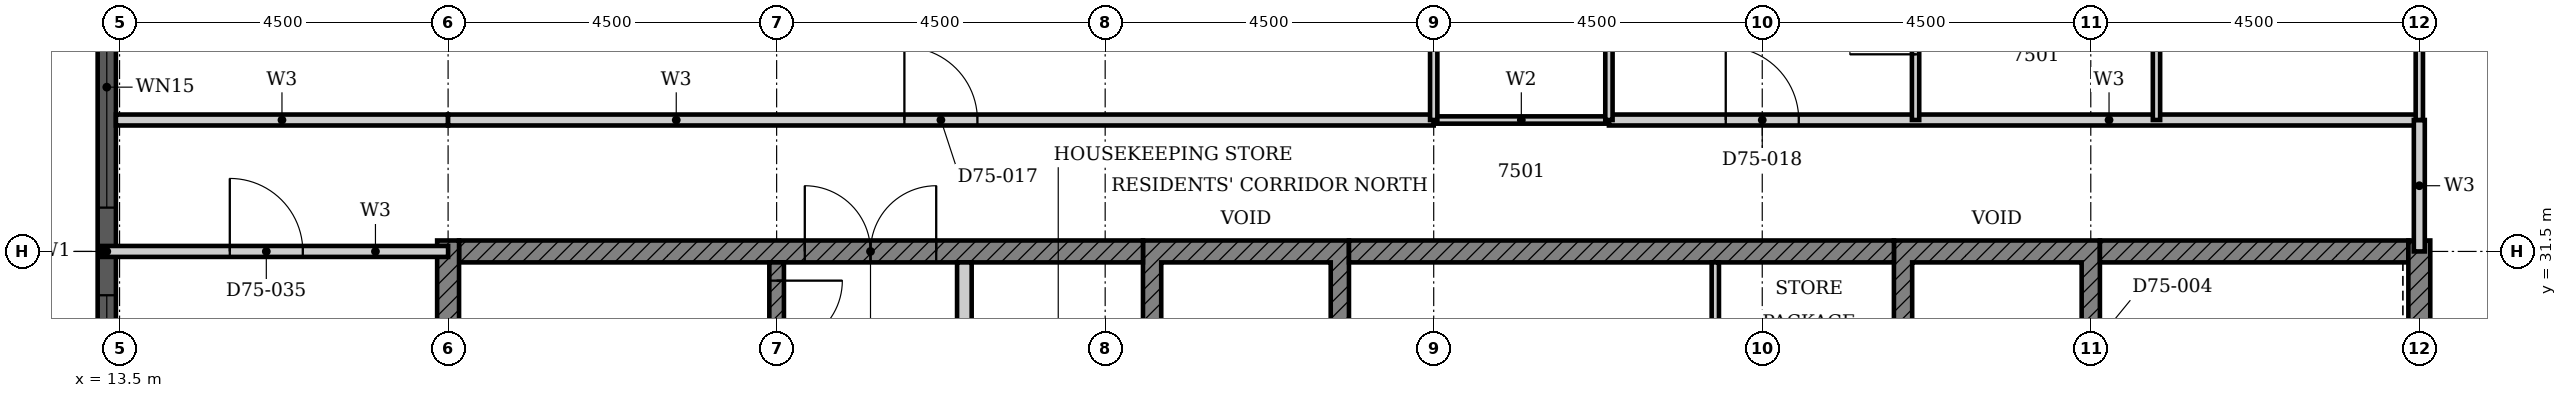
"""IFC4 building model, lengths in metres.
Left out: names, types, materials, properties, quantities, classifications, styles, units other than length and angle.
Written with IfcOpenShell. Run it as: python <this file> out.ifc"""

import sys

from ifc_helpers import new_model, si_unit, direction, frame, frame_2d, origin, place, context, subcontext, project, spatial, polyline, rectangle, outline, extrude, element, fill, save


model = new_model("IFC4")
c1 = context("Model", 3, precision=1e-05, world=origin(), true_north=direction((0.0, 1.0)))
c2 = subcontext(c1, "Body", "Model", "MODEL_VIEW")
j1 = project(units=[si_unit("LENGTHUNIT", "METRE"), si_unit("PLANEANGLEUNIT", "RADIAN")], contexts=[c1])
p1 = place(None, origin())
s1 = spatial("IfcSite", under=j1, at=p1, CompositionType="ELEMENT")
p2 = place(p1, origin())
s2 = spatial("IfcBuilding", under=s1, at=p2, CompositionType="ELEMENT")
p3 = place(p2, frame((0.0, 0.0, 294.5)))
s3 = spatial("IfcBuildingStorey", under=s2, at=p3, CompositionType="ELEMENT", Elevation=294.5)
p4 = place(p3, frame((13.325, 35.7, 0.0), z_axis=(0.0, 0.0, 1.0), x_axis=(0.0, -1.0, 0.0)))
e1 = element("IfcWall", 1, at=p4, inside=s3, PredefinedType="SOLIDWALL", context=c2, shape_type="SweptSolid", body=[
    extrude(rectangle(XDim=8.4, YDim=0.25, at=frame_2d((4.2, 0.0))), origin(), (0.0, 0.0, 1.0), 3.7),
])
p5 = place(p4, frame((0.3, 0.0, 0.45)))
e2 = element("IfcOpeningElement", 2, at=p5, cuts=e1, PredefinedType="OPENING", context=c2, shape_type="SweptSolid", body=[
    extrude(rectangle(XDim=3.3, YDim=2.3, at=frame_2d((1.65, 1.15))), frame((0.0, 0.135, 0.0), z_axis=(0.0, -1.0, 0.0), x_axis=(1.0, 0.0, 0.0)), (0.0, 0.0, 1.0), 0.27),
])
p6 = place(p4, frame((4.8, 0.0, 0.45)))
e3 = element("IfcOpeningElement", 3, at=p6, cuts=e1, PredefinedType="OPENING", context=c2, shape_type="SweptSolid", body=[
    extrude(rectangle(XDim=3.3, YDim=2.3, at=frame_2d((1.65, 1.15))), frame((0.0, 0.135, 0.0), z_axis=(0.0, -1.0, 0.0), x_axis=(1.0, 0.0, 0.0)), (0.0, 0.0, 1.0), 0.27),
])
p7 = place(p3, origin())
e4 = element("IfcWall", 4, at=p7, inside=s3, PredefinedType="SHEAR", context=c2, shape_type="SweptSolid", body=[
    extrude(outline(polyline([(27.518, 28.725), (27.768, 28.725), (27.768, 31.35), (30.089, 31.35), (30.089, 28.725), (30.339, 28.725), (30.339, 31.65), (27.518, 31.65), (27.518, 28.725)])), origin(), (0.0, 0.0, 1.0), 3.4),
])
p8 = place(p3, origin())
e5 = element("IfcWall", 5, at=p8, inside=s3, PredefinedType="SHEAR", context=c2, shape_type="SweptSolid", body=[
    extrude(outline(polyline([(37.803, 28.725), (38.053, 28.725), (38.053, 31.35), (40.375, 31.35), (40.375, 28.725), (40.625, 28.725), (40.625, 31.65), (37.803, 31.65), (37.803, 28.725)])), origin(), (0.0, 0.0, 1.0), 3.4),
])
p9 = place(p3, frame((18.15, 31.5, 0.0), z_axis=(0.0, 0.0, 1.0), x_axis=(1.0, 0.0, 0.0)))
e6 = element("IfcWall", 6, at=p9, inside=s3, PredefinedType="SHEAR", context=c2, shape_type="SweptSolid", body=[
    extrude(rectangle(XDim=9.368, YDim=0.3, at=frame_2d((4.684, 0.0))), origin(), (0.0, 0.0, 1.0), 3.4),
])
p10 = place(p9, frame((4.736, 0.0, 0.0)))
e7 = element("IfcOpeningElement", 7, at=p10, cuts=e6, PredefinedType="OPENING", context=c2, shape_type="SweptSolid", body=[
    extrude(rectangle(XDim=1.8, YDim=2.1, at=frame_2d((0.9, 1.05))), frame((0.0, 0.16, 0.0), z_axis=(0.0, -1.0, 0.0), x_axis=(1.0, 0.0, 0.0)), (0.0, 0.0, 1.0), 0.32),
])
p11 = place(p3, frame((30.339, 31.5, 0.0), z_axis=(0.0, 0.0, 1.0), x_axis=(1.0, 0.0, 0.0)))
e8 = element("IfcWall", 8, at=p11, inside=s3, PredefinedType="SHEAR", context=c2, shape_type="SweptSolid", body=[
    extrude(rectangle(XDim=7.464, YDim=0.3, at=frame_2d((3.732, 0.0))), origin(), (0.0, 0.0, 1.0), 3.4),
])
p12 = place(p3, frame((40.625, 31.5, 0.0), z_axis=(0.0, 0.0, 1.0), x_axis=(1.0, 0.0, 0.0)))
e9 = element("IfcWall", 9, at=p12, inside=s3, PredefinedType="SHEAR", context=c2, shape_type="SweptSolid", body=[
    extrude(rectangle(XDim=4.225, YDim=0.3, at=frame_2d((2.113, 0.0))), origin(), (0.0, 0.0, 1.0), 3.4),
])
for number, where, z_axis, x_axis in (
    (10, (18.0, 22.35, 0.0), (0.0, 0.0, 1.0), (0.0, 1.0, 0.0)),
    (11, (45.0, 22.35, 0.0), (0.0, 0.0, 1.0), (0.0, 1.0, 0.0)),
):
    element("IfcWall", number, at=place(p3, frame(where, z_axis=z_axis, x_axis=x_axis)), inside=s3, PredefinedType="SHEAR", context=c2, shape_type="SweptSolid", body=[
        extrude(rectangle(XDim=9.3, YDim=0.3, at=frame_2d((4.65, 0.0))), origin(), (0.0, 0.0, 1.0), 3.4),
    ])
p13 = place(p3, frame((25.072, 28.725, 0.0), z_axis=(0.0, 0.0, 1.0), x_axis=(0.0, 1.0, 0.0)))
e12 = element("IfcWall", 12, at=p13, inside=s3, PredefinedType="PARTITIONING", context=c2, shape_type="SweptSolid", body=[
    extrude(rectangle(XDim=2.625, YDim=0.2, at=frame_2d((1.312, 0.0))), origin(), (0.0, 0.0, 1.0), 3.4),
])
p14 = place(p3, frame((35.357, 28.725, 0.0), z_axis=(0.0, 0.0, 1.0), x_axis=(0.0, 1.0, 0.0)))
e13 = element("IfcWall", 13, at=p14, inside=s3, PredefinedType="PARTITIONING", context=c2, shape_type="SweptSolid", body=[
    extrude(rectangle(XDim=2.625, YDim=0.1, at=frame_2d((1.312, 0.0))), origin(), (0.0, 0.0, 1.0), 3.4),
])
p15 = place(p3, frame((22.5, 31.35, 0.0), z_axis=(0.0, 0.0, 1.0), x_axis=(0.0, -1.0, 0.0)))
e14 = element("IfcWall", 14, at=p15, inside=s3, PredefinedType="SHEAR", context=c2, shape_type="SweptSolid", body=[
    extrude(rectangle(XDim=5.825, YDim=0.2, at=frame_2d((2.913, 0.0))), origin(), (0.0, 0.0, 1.0), 3.4),
])
p16 = place(p15, frame((0.25, 0.0, 0.0)))
e15 = element("IfcOpeningElement", 15, at=p16, cuts=e14, PredefinedType="OPENING", context=c2, shape_type="SweptSolid", body=[
    extrude(rectangle(XDim=1.8, YDim=2.1, at=frame_2d((0.9, 1.05))), frame((0.0, 0.11, 0.0), z_axis=(0.0, -1.0, 0.0), x_axis=(1.0, 0.0, 0.0)), (0.0, 0.0, 1.0), 0.22),
])
p17 = place(p3, frame((13.26, 31.5, 0.0), z_axis=(0.0, 0.0, 1.0), x_axis=(1.0, 0.0, 0.0)))
e16 = element("IfcWall", 16, at=p17, inside=s3, PredefinedType="PARTITIONING", context=c2, shape_type="SweptSolid", body=[
    extrude(rectangle(XDim=4.74, YDim=0.15, at=frame_2d((2.37, 0.0))), origin(), (0.0, 0.0, 1.0), 3.4),
])
p18 = place(p17, frame((1.75, 0.0, 0.0)))
e17 = element("IfcOpeningElement", 17, at=p18, cuts=e16, PredefinedType="OPENING", context=c2, shape_type="SweptSolid", body=[
    extrude(rectangle(XDim=1.0, YDim=2.2, at=frame_2d((0.5, 1.1))), frame((0.0, 0.085, 0.0), z_axis=(0.0, -1.0, 0.0), x_axis=(1.0, 0.0, 0.0)), (0.0, 0.0, 1.0), 0.17),
])
p19 = place(p3, frame((13.45, 33.3, 0.0), z_axis=(0.0, 0.0, 1.0), x_axis=(1.0, 0.0, 0.0)))
e18 = element("IfcWall", 18, at=p19, inside=s3, PredefinedType="PARTITIONING", context=c2, shape_type="SweptSolid", body=[
    extrude(rectangle(XDim=4.549, YDim=0.15, at=frame_2d((2.274, 0.0))), origin(), (0.0, 0.0, 1.0), 3.4),
])
p20 = place(p3, frame((18.0, 33.3, 0.0), z_axis=(0.0, 0.0, 1.0), x_axis=(1.0, 0.0, 0.0)))
e19 = element("IfcWall", 19, at=p20, inside=s3, PredefinedType="PARTITIONING", context=c2, shape_type="SweptSolid", body=[
    extrude(rectangle(XDim=13.5, YDim=0.15, at=frame_2d((6.75, 0.0))), origin(), (0.0, 0.0, 1.0), 3.4),
])
p21 = place(p20, frame((6.25, 0.0, 0.0)))
e20 = element("IfcOpeningElement", 20, at=p21, cuts=e19, PredefinedType="OPENING", context=c2, shape_type="SweptSolid", body=[
    extrude(rectangle(XDim=1.0, YDim=2.1, at=frame_2d((0.5, 1.05))), frame((0.0, 0.085, 0.0), z_axis=(0.0, -1.0, 0.0), x_axis=(1.0, 0.0, 0.0)), (0.0, 0.0, 1.0), 0.17),
])
p22 = place(p3, frame((33.9, 33.3, 0.0), z_axis=(0.0, 0.0, 1.0), x_axis=(1.0, 0.0, 0.0)))
e21 = element("IfcWall", 21, at=p22, inside=s3, PredefinedType="PARTITIONING", context=c2, shape_type="SweptSolid", body=[
    extrude(rectangle(XDim=11.1, YDim=0.15, at=frame_2d((5.55, 0.0))), origin(), (0.0, 0.0, 1.0), 3.4),
])
p23 = place(p22, frame((1.6, 0.0, 0.0)))
e22 = element("IfcOpeningElement", 22, at=p23, cuts=e21, PredefinedType="OPENING", context=c2, shape_type="SweptSolid", body=[
    extrude(rectangle(XDim=1.0, YDim=2.2, at=frame_2d((0.5, 1.1))), frame((0.0, 0.085, 0.0), z_axis=(0.0, -1.0, 0.0), x_axis=(1.0, 0.0, 0.0)), (0.0, 0.0, 1.0), 0.17),
])
p24 = place(p3, frame((45.0, 31.5, 0.0), z_axis=(0.0, 0.0, 1.0), x_axis=(0.0, 1.0, 0.0)))
e23 = element("IfcWall", 23, at=p24, inside=s3, PredefinedType="PARTITIONING", context=c2, shape_type="SweptSolid", body=[
    extrude(rectangle(XDim=1.8, YDim=0.15, at=frame_2d((0.9, 0.0))), origin(), (0.0, 0.0, 1.0), 3.4),
])
p25 = place(p3, frame((38.1, 33.3, 0.0), z_axis=(0.0, 0.0, 1.0), x_axis=(0.0, 1.0, 0.0)))
e24 = element("IfcWall", 24, at=p25, inside=s3, PredefinedType="PARTITIONING", context=c2, shape_type="SweptSolid", body=[
    extrude(rectangle(XDim=2.7, YDim=0.1, at=frame_2d((1.35, 0.0))), origin(), (0.0, 0.0, 1.0), 3.4),
])
p26 = place(p25, frame((0.9, 0.0, 0.0)))
e25 = element("IfcOpeningElement", 25, at=p26, cuts=e24, PredefinedType="OPENING", context=c2, shape_type="SweptSolid", body=[
    extrude(rectangle(XDim=0.9, YDim=2.1, at=frame_2d((0.45, 1.05))), frame((0.0, 0.06, 0.0), z_axis=(0.0, -1.0, 0.0), x_axis=(1.0, 0.0, 0.0)), (0.0, 0.0, 1.0), 0.12),
])
p27 = place(p3, frame((41.4, 33.3, 0.0), z_axis=(0.0, 0.0, 1.0), x_axis=(0.0, 1.0, 0.0)))
e26 = element("IfcWall", 26, at=p27, inside=s3, PredefinedType="PARTITIONING", context=c2, shape_type="SweptSolid", body=[
    extrude(rectangle(XDim=2.7, YDim=0.1, at=frame_2d((1.35, 0.0))), origin(), (0.0, 0.0, 1.0), 3.4),
])
p28 = place(p3, frame((45.0, 33.3, 0.0), z_axis=(0.0, 0.0, 1.0), x_axis=(0.0, 1.0, 0.0)))
e27 = element("IfcWall", 27, at=p28, inside=s3, PredefinedType="PARTITIONING", context=c2, shape_type="SweptSolid", body=[
    extrude(rectangle(XDim=4.9, YDim=0.1, at=frame_2d((2.45, 0.0))), origin(), (0.0, 0.0, 1.0), 3.4),
])
p29 = place(p3, frame((31.5, 33.3, 0.0), z_axis=(0.0, 0.0, 1.0), x_axis=(1.0, 0.0, 0.0)))
e28 = element("IfcWall", 28, at=p29, inside=s3, PredefinedType="PARTITIONING", context=c2, shape_type="SweptSolid", body=[
    extrude(rectangle(XDim=2.4, YDim=0.1, at=frame_2d((1.2, 0.0))), origin(), (0.0, 0.0, 1.0), 3.4),
])
p30 = place(p3, frame((31.5, 33.3, 0.0), z_axis=(0.0, 0.0, 1.0), x_axis=(0.0, 1.0, 0.0)))
e29 = element("IfcWall", 29, at=p30, inside=s3, PredefinedType="PARTITIONING", context=c2, shape_type="SweptSolid", body=[
    extrude(rectangle(XDim=2.7, YDim=0.1, at=frame_2d((1.35, 0.0))), origin(), (0.0, 0.0, 1.0), 3.4),
])
p31 = place(p3, frame((33.9, 33.3, 0.0), z_axis=(0.0, 0.0, 1.0), x_axis=(0.0, 1.0, 0.0)))
e30 = element("IfcWall", 30, at=p31, inside=s3, PredefinedType="PARTITIONING", context=c2, shape_type="SweptSolid", body=[
    extrude(rectangle(XDim=2.7, YDim=0.1, at=frame_2d((1.35, 0.0))), origin(), (0.0, 0.0, 1.0), 3.4),
])
p32 = place(p31, frame((0.95, 0.0, 0.0)))
e31 = element("IfcOpeningElement", 31, at=p32, cuts=e30, PredefinedType="OPENING", context=c2, shape_type="SweptSolid", body=[
    extrude(rectangle(XDim=0.8, YDim=2.1, at=frame_2d((0.4, 1.05))), frame((0.0, 0.06, 0.0), z_axis=(0.0, -1.0, 0.0), x_axis=(1.0, 0.0, 0.0)), (0.0, 0.0, 1.0), 0.12),
])
p33 = place(p5, origin())
e32 = element("IfcWindow", 32, at=p33, inside=s3, PartitioningType="SINGLE_PANEL", PredefinedType="WINDOW", context=c2, shape_type="SweptSolid", body=[
    extrude(rectangle(XDim=3.3, YDim=2.3, at=frame_2d((1.65, 1.15))), frame((0.0, 0.03, 0.0), z_axis=(0.0, -1.0, 0.0), x_axis=(1.0, 0.0, 0.0)), (0.0, 0.0, 1.0), 0.06),
])
fill(e2, e32)
p34 = place(p6, origin())
e33 = element("IfcWindow", 33, at=p34, inside=s3, PartitioningType="SINGLE_PANEL", PredefinedType="WINDOW", context=c2, shape_type="SweptSolid", body=[
    extrude(rectangle(XDim=3.3, YDim=2.3, at=frame_2d((1.65, 1.15))), frame((0.0, 0.03, 0.0), z_axis=(0.0, -1.0, 0.0), x_axis=(1.0, 0.0, 0.0)), (0.0, 0.0, 1.0), 0.06),
])
fill(e3, e33)
p35 = place(p16, origin())
e34 = element("IfcDoor", 34, at=p35, inside=s3, OperationType="DOUBLE_DOOR_SINGLE_SWING", PredefinedType="DOOR", context=c2, shape_type="SweptSolid", body=[
    extrude(rectangle(XDim=1.8, YDim=2.1, at=frame_2d((0.9, 1.05))), frame((0.0, 0.025, 0.0), z_axis=(0.0, -1.0, 0.0), x_axis=(1.0, 0.0, 0.0)), (0.0, 0.0, 1.0), 0.05),
])
fill(e15, e34)
p36 = place(p10, origin())
e35 = element("IfcDoor", 35, at=p36, inside=s3, OperationType="DOUBLE_DOOR_SINGLE_SWING", PredefinedType="DOOR", context=c2, shape_type="SweptSolid", body=[
    extrude(rectangle(XDim=1.8, YDim=2.1, at=frame_2d((0.9, 1.05))), frame((0.0, 0.025, 0.0), z_axis=(0.0, -1.0, 0.0), x_axis=(1.0, 0.0, 0.0)), (0.0, 0.0, 1.0), 0.05),
])
fill(e7, e35)
p37 = place(p21, origin())
e36 = element("IfcDoor", 36, at=p37, inside=s3, OperationType="SINGLE_SWING_LEFT", PredefinedType="DOOR", context=c2, shape_type="SweptSolid", body=[
    extrude(rectangle(XDim=1.0, YDim=2.1, at=frame_2d((0.5, 1.05))), frame((0.0, 0.025, 0.0), z_axis=(0.0, -1.0, 0.0), x_axis=(1.0, 0.0, 0.0)), (0.0, 0.0, 1.0), 0.05),
])
fill(e20, e36)
p38 = place(p23, origin())
e37 = element("IfcDoor", 37, at=p38, inside=s3, OperationType="SINGLE_SWING_RIGHT", PredefinedType="DOOR", context=c2, shape_type="SweptSolid", body=[
    extrude(rectangle(XDim=1.0, YDim=2.2, at=frame_2d((0.5, 1.1))), frame((0.0, 0.025, 0.0), z_axis=(0.0, -1.0, 0.0), x_axis=(1.0, 0.0, 0.0)), (0.0, 0.0, 1.0), 0.05),
])
fill(e22, e37)
p39 = place(p26, origin())
e38 = element("IfcDoor", 38, at=p39, inside=s3, OperationType="SINGLE_SWING_RIGHT", PredefinedType="DOOR", context=c2, shape_type="SweptSolid", body=[
    extrude(rectangle(XDim=0.9, YDim=2.1, at=frame_2d((0.45, 1.05))), frame((0.0, 0.025, 0.0), z_axis=(0.0, -1.0, 0.0), x_axis=(1.0, 0.0, 0.0)), (0.0, 0.0, 1.0), 0.05),
])
fill(e25, e38)
p40 = place(p18, origin())
e39 = element("IfcDoor", 39, at=p40, inside=s3, OperationType="SINGLE_SWING_LEFT", PredefinedType="DOOR", context=c2, shape_type="SweptSolid", body=[
    extrude(rectangle(XDim=1.0, YDim=2.2, at=frame_2d((0.5, 1.1))), frame((0.0, 0.025, 0.0), z_axis=(0.0, -1.0, 0.0), x_axis=(1.0, 0.0, 0.0)), (0.0, 0.0, 1.0), 0.05),
])
fill(e17, e39)
save(model, sys.argv[1])
